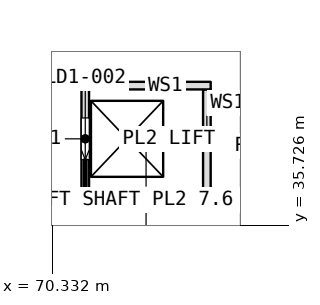
"""IFC4 building model, lengths in metres.
Left out: names, types, materials, properties, quantities, classifications, styles, units other than length and angle.
Written with IfcOpenShell. Run it as: python <this file> out.ifc"""

import sys

from ifc_helpers import new_model, si_unit, direction, frame, frame_2d, origin, place, context, subcontext, project, spatial, rectangle, extrude, element, fill, save


model = new_model("IFC4")
c1 = context("Model", 3, precision=1e-05, world=origin(), true_north=direction((0.0, 1.0)))
c2 = subcontext(c1, "Body", "Model", "MODEL_VIEW")
j1 = project(units=[si_unit("LENGTHUNIT", "METRE"), si_unit("PLANEANGLEUNIT", "RADIAN")], contexts=[c1])
p1 = place(None, origin())
s1 = spatial("IfcSite", under=j1, at=p1, CompositionType="ELEMENT")
p2 = place(p1, origin())
s2 = spatial("IfcBuilding", under=s1, at=p2, CompositionType="ELEMENT")
p3 = place(p2, frame((0.0, 0.0, -9.9)))
s3 = spatial("IfcBuildingStorey", under=s2, at=p3, CompositionType="ELEMENT", Elevation=-9.9)
for number, where, z_axis, x_axis in (
    (1, (71.1, 36.6, 0.0), (0.0, 0.0, 1.0), (1.0, 0.0, 0.0)),
    (2, (71.1, 39.4, 0.0), (0.0, 0.0, 1.0), (1.0, 0.0, 0.0)),
):
    element("IfcWall", number, at=place(p3, frame(where, z_axis=z_axis, x_axis=x_axis)), inside=s3, PredefinedType="PARTITIONING", context=c2, shape_type="SweptSolid", body=[
        extrude(rectangle(XDim=3.4, YDim=0.2, at=frame_2d((1.7, 0.0))), origin(), (0.0, 0.0, 1.0), 2.4),
    ])
p4 = place(p3, frame((71.2, 36.7, 0.0), z_axis=(0.0, 0.0, 1.0), x_axis=(0.0, 1.0, 0.0)))
e3 = element("IfcWall", 3, at=p4, inside=s3, PredefinedType="PARTITIONING", context=c2, shape_type="SweptSolid", body=[
    extrude(rectangle(XDim=2.6, YDim=0.2, at=frame_2d((1.3, 0.0))), origin(), (0.0, 0.0, 1.0), 2.4),
])
p5 = place(p4, frame((0.75, 0.0, 0.0)))
e4 = element("IfcOpeningElement", 4, at=p5, cuts=e3, PredefinedType="OPENING", context=c2, shape_type="SweptSolid", body=[
    extrude(rectangle(XDim=1.1, YDim=2.1, at=frame_2d((0.55, 1.05))), frame((0.0, 0.11, 0.0), z_axis=(0.0, -1.0, 0.0), x_axis=(1.0, 0.0, 0.0)), (0.0, 0.0, 1.0), 0.22),
])
p6 = place(p3, frame((74.4, 36.7, 0.0), z_axis=(0.0, 0.0, 1.0), x_axis=(0.0, 1.0, 0.0)))
e5 = element("IfcWall", 5, at=p6, inside=s3, PredefinedType="PARTITIONING", context=c2, shape_type="SweptSolid", body=[
    extrude(rectangle(XDim=2.6, YDim=0.2, at=frame_2d((1.3, 0.0))), origin(), (0.0, 0.0, 1.0), 2.4),
])
p7 = place(p5, origin())
e6 = element("IfcDoor", 6, at=p7, inside=s3, OperationType="SLIDING_TO_LEFT", PredefinedType="USERDEFINED", context=c2, shape_type="SweptSolid", body=[
    extrude(rectangle(XDim=1.1, YDim=2.1, at=frame_2d((0.55, 1.05))), frame((0.0, 0.025, 0.0), z_axis=(0.0, -1.0, 0.0), x_axis=(1.0, 0.0, 0.0)), (0.0, 0.0, 1.0), 0.05),
])
fill(e4, e6)
save(model, sys.argv[1])
